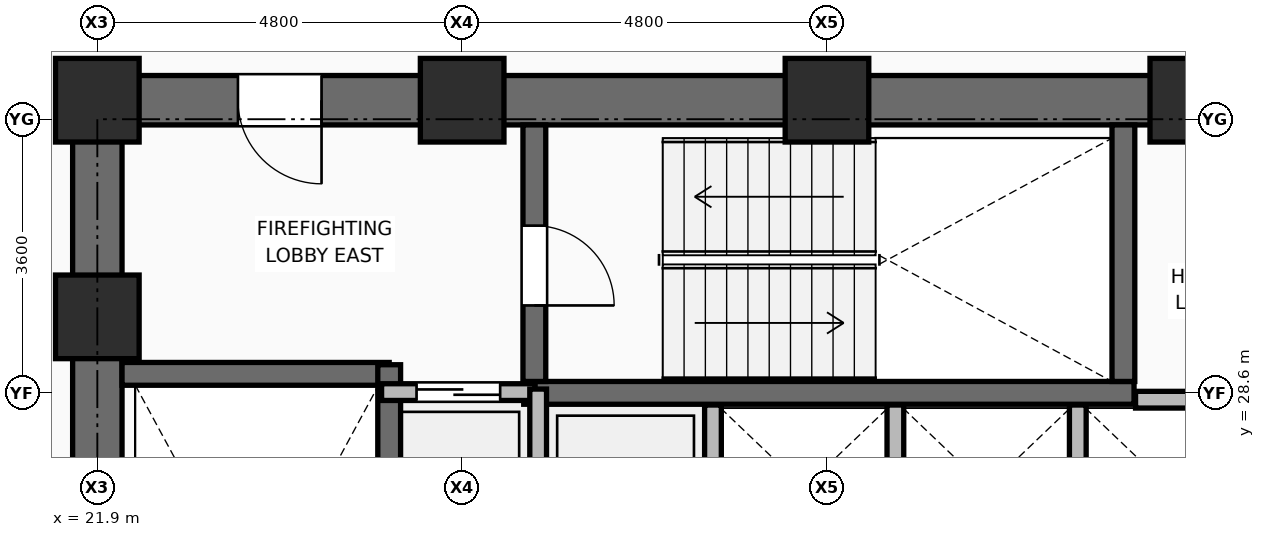
"""IFC4 building model, lengths in metres.
Left out: names, types, materials, properties, quantities, classifications, styles, units other than length and angle.
Written with IfcOpenShell. Run it as: python <this file> out.ifc"""

import sys

from ifc_helpers import new_model, si_unit, direction, frame, frame_2d, origin, origin_2d, place, context, subcontext, project, spatial, rectangle, extrude, element, fill, save


model = new_model("IFC4")
c1 = context("Model", 3, precision=1e-05, world=origin(), true_north=direction((0.0, 1.0)))
c2 = subcontext(c1, "Body", "Model", "MODEL_VIEW")
j1 = project(units=[si_unit("LENGTHUNIT", "METRE"), si_unit("PLANEANGLEUNIT", "RADIAN")], contexts=[c1])
p1 = place(None, origin())
s1 = spatial("IfcSite", under=j1, at=p1, CompositionType="ELEMENT")
p2 = place(p1, origin())
s2 = spatial("IfcBuilding", under=s1, at=p2, CompositionType="ELEMENT")
p3 = place(p2, frame((0.0, 0.0, 79.5)))
s3 = spatial("IfcBuildingStorey", under=s2, at=p3, CompositionType="ELEMENT", Elevation=79.5)
for number, where, z_axis, x_axis in (
    (1, (21.9, 29.6, 0.0), (0.0, 0.0, 1.0), (1.0, 0.0, 0.0)),
    (2, (21.9, 32.45, 0.0), (0.0, 0.0, 1.0), (1.0, 0.0, 0.0)),
    (3, (26.7, 32.45, 0.0), (0.0, 0.0, 1.0), (1.0, 0.0, 0.0)),
    (4, (31.5, 32.45, 0.0), (0.0, 0.0, 1.0), (1.0, 0.0, 0.0)),
    (5, (36.3, 32.45, 0.0), (0.0, 0.0, 1.0), (1.0, 0.0, 0.0)),
):
    element("IfcColumn", number, at=place(p3, frame(where, z_axis=z_axis, x_axis=x_axis)), inside=s3, PredefinedType="COLUMN", context=c2, shape_type="SweptSolid", body=[
        extrude(rectangle(XDim=1.1, YDim=1.1, at=origin_2d()), origin(), (0.0, 0.0, 1.0), 3.75),
    ])
p4 = place(p3, frame((30.0, 25.71, 0.0), z_axis=(0.0, 0.0, 1.0), x_axis=(0.0, 1.0, 0.0)))
e6 = element("IfcWall", 6, at=p4, inside=s3, PredefinedType="PARTITIONING", context=c2, shape_type="SweptSolid", body=[
    extrude(rectangle(XDim=2.73, YDim=0.22, at=frame_2d((1.365, 0.0))), origin(), (0.0, 0.0, 1.0), 3.545),
])
p5 = place(p3, frame((32.4, 26.2, 0.0), z_axis=(0.0, 0.0, 1.0), x_axis=(0.0, 1.0, 0.0)))
e7 = element("IfcWall", 7, at=p5, inside=s3, PredefinedType="PARTITIONING", context=c2, shape_type="SweptSolid", body=[
    extrude(rectangle(XDim=2.24, YDim=0.22, at=frame_2d((1.12, 0.0))), origin(), (0.0, 0.0, 1.0), 3.545),
])
p6 = place(p3, frame((34.8, 26.23, 0.0), z_axis=(0.0, 0.0, 1.0), x_axis=(0.0, 1.0, 0.0)))
e8 = element("IfcWall", 8, at=p6, inside=s3, PredefinedType="PARTITIONING", context=c2, shape_type="SweptSolid", body=[
    extrude(rectangle(XDim=2.21, YDim=0.22, at=frame_2d((1.105, 0.0))), origin(), (0.0, 0.0, 1.0), 3.545),
])
p7 = place(p3, frame((21.575, 32.45, 0.0), z_axis=(0.0, 0.0, 1.0), x_axis=(1.0, 0.0, 0.0)))
e9 = element("IfcWall", 9, at=p7, inside=s3, PredefinedType="SHEAR", context=c2, shape_type="SweptSolid", body=[
    extrude(rectangle(XDim=19.85, YDim=0.65, at=frame_2d((9.925, 0.0))), origin(), (0.0, 0.0, 1.0), 3.57),
])
p8 = place(p7, frame((2.175, 0.0, 0.0)))
e10 = element("IfcOpeningElement", 10, at=p8, cuts=e9, PredefinedType="OPENING", context=c2, shape_type="SweptSolid", body=[
    extrude(rectangle(XDim=1.1, YDim=2.1, at=frame_2d((0.55, 1.05))), frame((0.0, 0.335, 0.0), z_axis=(0.0, -1.0, 0.0), x_axis=(1.0, 0.0, 0.0)), (0.0, 0.0, 1.0), 0.67),
])
p9 = place(p7, frame((15.565, 0.0, 0.0)))
e11 = element("IfcOpeningElement", 11, at=p9, cuts=e9, PredefinedType="OPENING", context=c2, shape_type="SweptSolid", body=[
    extrude(rectangle(XDim=1.0, YDim=2.1, at=frame_2d((0.5, 1.05))), frame((0.0, 0.335, 0.0), z_axis=(0.0, -1.0, 0.0), x_axis=(1.0, 0.0, 0.0)), (0.0, 0.0, 1.0), 0.67),
])
p10 = place(p7, frame((17.575, 0.0, 0.0)))
e12 = element("IfcOpeningElement", 12, at=p10, cuts=e9, PredefinedType="OPENING", context=c2, shape_type="SweptSolid", body=[
    extrude(rectangle(XDim=0.9, YDim=2.1, at=frame_2d((0.45, 1.05))), frame((0.0, 0.335, 0.0), z_axis=(0.0, -1.0, 0.0), x_axis=(1.0, 0.0, 0.0)), (0.0, 0.0, 1.0), 0.67),
])
p11 = place(p3, frame((21.9, 18.125, 0.0), z_axis=(0.0, 0.0, 1.0), x_axis=(0.0, 1.0, 0.0)))
e13 = element("IfcWall", 13, at=p11, inside=s3, PredefinedType="SHEAR", context=c2, shape_type="SweptSolid", body=[
    extrude(rectangle(XDim=14.0, YDim=0.65, at=frame_2d((7.0, 0.0))), origin(), (0.0, 0.0, 1.0), 3.57),
])
p12 = place(p3, frame((22.225, 28.85, 0.0), z_axis=(0.0, 0.0, 1.0), x_axis=(1.0, 0.0, 0.0)))
e14 = element("IfcWall", 14, at=p12, inside=s3, PredefinedType="SHEAR", context=c2, shape_type="SweptSolid", body=[
    extrude(rectangle(XDim=3.515, YDim=0.3, at=frame_2d((1.757, 0.0))), origin(), (0.0, 0.0, 1.0), 3.57),
])
p13 = place(p3, frame((25.74, 20.98, 0.0), z_axis=(0.0, 0.0, 1.0), x_axis=(0.0, 1.0, 0.0)))
e15 = element("IfcWall", 15, at=p13, inside=s3, PredefinedType="SHEAR", context=c2, shape_type="SweptSolid", body=[
    extrude(rectangle(XDim=7.99, YDim=0.3, at=frame_2d((3.995, 0.0))), origin(), (0.0, 0.0, 1.0), 3.57),
])
p14 = place(p3, frame((27.51, 28.6, 0.0), z_axis=(0.0, 0.0, 1.0), x_axis=(1.0, 0.0, 0.0)))
e16 = element("IfcWall", 16, at=p14, inside=s3, PredefinedType="SHEAR", context=c2, shape_type="SweptSolid", body=[
    extrude(rectangle(XDim=8.03, YDim=0.3, at=frame_2d((4.015, 0.0))), origin(), (0.0, 0.0, 1.0), 3.57),
])
p15 = place(p3, frame((27.65, 28.75, 0.0), z_axis=(0.0, 0.0, 1.0), x_axis=(0.0, 1.0, 0.0)))
e17 = element("IfcWall", 17, at=p15, inside=s3, PredefinedType="SHEAR", context=c2, shape_type="SweptSolid", body=[
    extrude(rectangle(XDim=3.375, YDim=0.3, at=frame_2d((1.688, 0.0))), origin(), (0.0, 0.0, 1.0), 3.57),
])
p16 = place(p15, frame((1.0, 0.0, 0.0)))
e18 = element("IfcOpeningElement", 18, at=p16, cuts=e17, PredefinedType="OPENING", context=c2, shape_type="SweptSolid", body=[
    extrude(rectangle(XDim=1.05, YDim=2.1, at=frame_2d((0.525, 1.05))), frame((0.0, 0.16, 0.0), z_axis=(0.0, -1.0, 0.0), x_axis=(1.0, 0.0, 0.0)), (0.0, 0.0, 1.0), 0.32),
])
p17 = place(p3, frame((35.4, 28.75, 0.0), z_axis=(0.0, 0.0, 1.0), x_axis=(0.0, 1.0, 0.0)))
e19 = element("IfcWall", 19, at=p17, inside=s3, PredefinedType="SHEAR", context=c2, shape_type="SweptSolid", body=[
    extrude(rectangle(XDim=3.375, YDim=0.3, at=frame_2d((1.688, 0.0))), origin(), (0.0, 0.0, 1.0), 3.57),
])
p18 = place(p3, frame((25.64, 28.61, 0.0), z_axis=(0.0, 0.0, 1.0), x_axis=(1.0, 0.0, 0.0)))
e20 = element("IfcWall", 20, at=p18, inside=s3, PredefinedType="PARTITIONING", context=c2, shape_type="SweptSolid", body=[
    extrude(rectangle(XDim=2.02, YDim=0.22, at=frame_2d((1.01, 0.0))), origin(), (0.0, 0.0, 1.0), 3.55),
])
p19 = place(p18, frame((0.46, 0.0, 0.0)))
e21 = element("IfcOpeningElement", 21, at=p19, cuts=e20, PredefinedType="OPENING", context=c2, shape_type="SweptSolid", body=[
    extrude(rectangle(XDim=1.1, YDim=2.2, at=frame_2d((0.55, 1.1))), frame((0.0, 0.12, 0.0), z_axis=(0.0, -1.0, 0.0), x_axis=(1.0, 0.0, 0.0)), (0.0, 0.0, 1.0), 0.24),
])
p20 = place(p3, frame((35.56, 28.51, 0.0), z_axis=(0.0, 0.0, 1.0), x_axis=(1.0, 0.0, 0.0)))
e22 = element("IfcWall", 22, at=p20, inside=s3, PredefinedType="PARTITIONING", context=c2, shape_type="SweptSolid", body=[
    extrude(rectangle(XDim=1.6, YDim=0.22, at=frame_2d((0.8, 0.0))), origin(), (0.0, 0.0, 1.0), 3.55),
])
p21 = place(p3, frame((27.7, 25.65, 0.0), z_axis=(0.0, 0.0, 1.0), x_axis=(0.0, 1.0, 0.0)))
e23 = element("IfcWall", 23, at=p21, inside=s3, PredefinedType="PARTITIONING", context=c2, shape_type="SweptSolid", body=[
    extrude(rectangle(XDim=3.0, YDim=0.22, at=frame_2d((1.5, 0.0))), origin(), (0.0, 0.0, 1.0), 3.55),
])
p22 = place(p16, frame((1.05, 0.0, 0.0), z_axis=(0.0, 0.0, 1.0), x_axis=(-1.0, 0.0, 0.0)))
e24 = element("IfcDoor", 24, at=p22, inside=s3, OperationType="SINGLE_SWING_RIGHT", PredefinedType="DOOR", context=c2, shape_type="SweptSolid", body=[
    extrude(rectangle(XDim=1.05, YDim=2.1, at=frame_2d((0.525, 1.05))), frame((0.0, 0.025, 0.0), z_axis=(0.0, -1.0, 0.0), x_axis=(1.0, 0.0, 0.0)), (0.0, 0.0, 1.0), 0.05),
])
fill(e18, e24)
p23 = place(p19, origin())
e25 = element("IfcDoor", 25, at=p23, inside=s3, OperationType="DOUBLE_DOOR_SLIDING", PredefinedType="DOOR", context=c2, shape_type="SweptSolid", body=[
    extrude(rectangle(XDim=1.1, YDim=2.2, at=frame_2d((0.55, 1.1))), frame((0.0, 0.025, 0.0), z_axis=(0.0, -1.0, 0.0), x_axis=(1.0, 0.0, 0.0)), (0.0, 0.0, 1.0), 0.05),
])
fill(e21, e25)
p24 = place(p8, frame((1.1, 0.0, 0.0), z_axis=(0.0, 0.0, 1.0), x_axis=(-1.0, 0.0, 0.0)))
e26 = element("IfcDoor", 26, at=p24, inside=s3, OperationType="SINGLE_SWING_LEFT", PredefinedType="DOOR", context=c2, shape_type="SweptSolid", body=[
    extrude(rectangle(XDim=1.1, YDim=2.1, at=frame_2d((0.55, 1.05))), frame((0.0, 0.025, 0.0), z_axis=(0.0, -1.0, 0.0), x_axis=(1.0, 0.0, 0.0)), (0.0, 0.0, 1.0), 0.05),
])
fill(e10, e26)
save(model, sys.argv[1])
